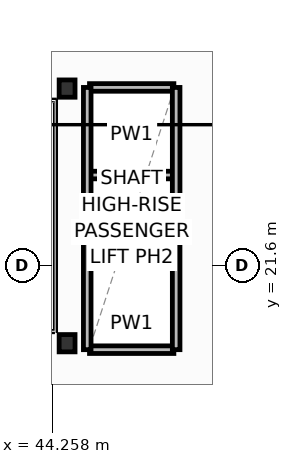
"""IFC4 building model, lengths in metres.
Left out: names, types, materials, properties, quantities, classifications, styles, units other than length and angle.
Written with IfcOpenShell. Run it as: python <this file> out.ifc"""

import sys

from ifc_helpers import new_model, si_unit, direction, frame, frame_2d, origin, origin_2d, place, context, subcontext, project, spatial, rectangle, i_section, extrude, element, save


model = new_model("IFC4")
c1 = context("Model", 3, precision=1e-05, world=origin(), true_north=direction((0.0, 1.0)))
c2 = subcontext(c1, "Body", "Model", "MODEL_VIEW")
j1 = project(units=[si_unit("LENGTHUNIT", "METRE"), si_unit("PLANEANGLEUNIT", "RADIAN")], contexts=[c1])
p1 = place(None, origin())
s1 = spatial("IfcSite", under=j1, at=p1, CompositionType="ELEMENT")
p2 = place(p1, origin())
s2 = spatial("IfcBuilding", under=s1, at=p2, CompositionType="ELEMENT")
p3 = place(p2, frame((0.0, 0.0, 182.0)))
s3 = spatial("IfcBuildingStorey", under=s2, at=p3, CompositionType="ELEMENT", Elevation=182.0)
for number, where, z_axis, x_axis in (
    (1, (44.65, 19.55, 0.0), (0.0, 0.0, 1.0), (1.0, 0.0, 0.0)),
    (2, (44.65, 26.25, 0.0), (0.0, 0.0, 1.0), (1.0, 0.0, 0.0)),
):
    element("IfcColumn", number, at=place(p3, frame(where, z_axis=z_axis, x_axis=x_axis)), inside=s3, PredefinedType="COLUMN", context=c2, shape_type="SweptSolid", body=[
        extrude(i_section(OverallWidth=0.418, OverallDepth=0.455, WebThickness=0.042, FlangeThickness=0.068, FilletRadius=0.025, at=origin_2d()), origin(), (0.0, 0.0, 1.0), 3.7),
    ])
for number, where, z_axis, x_axis in (
    (3, (45.24, 21.675, 0.0), (0.0, 0.0, 1.0), (1.0, 0.0, 0.0)),
    (4, (45.24, 23.975, 0.0), (0.0, 0.0, 1.0), (1.0, 0.0, 0.0)),
):
    element("IfcWall", number, at=place(p3, frame(where, z_axis=z_axis, x_axis=x_axis)), inside=s3, PredefinedType="PARTITIONING", context=c2, shape_type="SweptSolid", body=[
        extrude(rectangle(XDim=2.22, YDim=0.2, at=frame_2d((1.11, 0.0))), origin(), (0.0, 0.0, 1.0), 3.45),
    ])
p4 = place(p3, frame((45.24, 19.38, 0.0), z_axis=(0.0, 0.0, 1.0), x_axis=(1.0, 0.0, 0.0)))
e5 = element("IfcWall", 5, at=p4, inside=s3, PredefinedType="PARTITIONING", context=c2, shape_type="SweptSolid", body=[
    extrude(rectangle(XDim=2.22, YDim=0.2, at=frame_2d((1.11, 0.0))), origin(), (0.0, 0.0, 1.0), 2.662),
])
p5 = place(p3, frame((45.24, 26.28, 0.0), z_axis=(0.0, 0.0, 1.0), x_axis=(1.0, 0.0, 0.0)))
e6 = element("IfcWall", 6, at=p5, inside=s3, PredefinedType="PARTITIONING", context=c2, shape_type="SweptSolid", body=[
    extrude(rectangle(XDim=2.22, YDim=0.2, at=frame_2d((1.11, 0.0))), origin(), (0.0, 0.0, 1.0), 3.45),
])
for number, where, z_axis, x_axis in (
    (7, (45.18, 19.38, 0.0), (0.0, 0.0, 1.0), (0.0, 1.0, 0.0)),
    (8, (47.52, 19.38, 0.0), (0.0, 0.0, 1.0), (0.0, 1.0, 0.0)),
):
    element("IfcWall", number, at=place(p3, frame(where, z_axis=z_axis, x_axis=x_axis)), inside=s3, PredefinedType="PARTITIONING", context=c2, shape_type="SweptSolid", body=[
        extrude(rectangle(XDim=6.9, YDim=0.2, at=frame_2d((3.45, 0.0))), origin(), (0.0, 0.0, 1.0), 3.45),
    ])
save(model, sys.argv[1])
